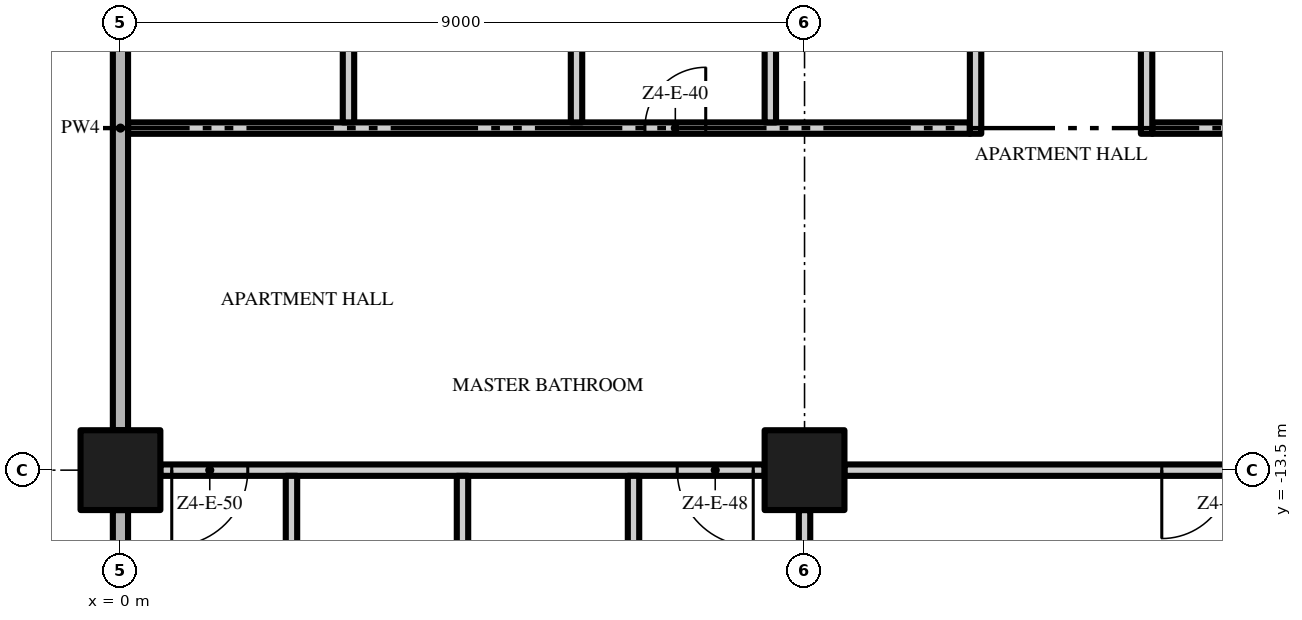
"""IFC4 building model, lengths in metres.
Left out: names, types, materials, properties, quantities, classifications, styles, units other than length and angle.
Written with IfcOpenShell. Run it as: python <this file> out.ifc"""

import sys

from ifc_helpers import new_model, si_unit, direction, frame, frame_2d, origin, origin_2d, place, context, subcontext, project, spatial, rectangle, extrude, element, fill, save


model = new_model("IFC4")
c1 = context("Model", 3, precision=1e-05, world=origin(), true_north=direction((0.0, 1.0)))
c2 = subcontext(c1, "Body", "Model", "MODEL_VIEW")
j1 = project(units=[si_unit("LENGTHUNIT", "METRE"), si_unit("PLANEANGLEUNIT", "RADIAN")], contexts=[c1])
p1 = place(None, origin())
s1 = spatial("IfcSite", under=j1, at=p1, CompositionType="ELEMENT")
p2 = place(p1, origin())
s2 = spatial("IfcBuilding", under=s1, at=p2, CompositionType="ELEMENT")
p3 = place(p2, frame((0.0, 0.0, 226.2)))
s3 = spatial("IfcBuildingStorey", under=s2, at=p3, CompositionType="ELEMENT", Elevation=226.2)
for number, where, z_axis, x_axis in (
    (1, (0.0, -13.5, 0.0), (0.0, 0.0, 1.0), (1.0, 0.0, 0.0)),
    (2, (9.0, -13.5, 0.0), (0.0, 0.0, 1.0), (1.0, 0.0, 0.0)),
):
    element("IfcColumn", number, at=place(p3, frame(where, z_axis=z_axis, x_axis=x_axis)), inside=s3, PredefinedType="COLUMN", context=c2, shape_type="SweptSolid", body=[
        extrude(rectangle(XDim=1.05, YDim=1.05, at=origin_2d()), origin(), (0.0, 0.0, 1.0), 3.5),
    ])
p4 = place(p3, frame((8.475, -13.5, 0.0), z_axis=(0.0, 0.0, 1.0), x_axis=(-1.0, 0.0, 0.0)))
e3 = element("IfcWall", 3, at=p4, inside=s3, PredefinedType="PARTITIONING", context=c2, shape_type="SweptSolid", body=[
    extrude(rectangle(XDim=7.95, YDim=0.15, at=frame_2d((3.975, 0.0))), origin(), (0.0, 0.0, 1.0), 3.5),
])
p5 = place(p4, frame((0.15, 0.0, 0.0)))
e4 = element("IfcOpeningElement", 4, at=p5, cuts=e3, PredefinedType="OPENING", context=c2, shape_type="SweptSolid", body=[
    extrude(rectangle(XDim=1.0, YDim=2.4, at=frame_2d((0.5, 1.2))), frame((0.0, 0.085, 0.0), z_axis=(0.0, -1.0, 0.0), x_axis=(1.0, 0.0, 0.0)), (0.0, 0.0, 1.0), 0.17),
])
p6 = place(p4, frame((6.8, 0.0, 0.0)))
e5 = element("IfcOpeningElement", 5, at=p6, cuts=e3, PredefinedType="OPENING", context=c2, shape_type="SweptSolid", body=[
    extrude(rectangle(XDim=1.0, YDim=2.4, at=frame_2d((0.5, 1.2))), frame((0.0, 0.085, 0.0), z_axis=(0.0, -1.0, 0.0), x_axis=(1.0, 0.0, 0.0)), (0.0, 0.0, 1.0), 0.17),
])
p7 = place(p3, frame((17.475, -13.5, 0.0), z_axis=(0.0, 0.0, 1.0), x_axis=(-1.0, 0.0, 0.0)))
e6 = element("IfcWall", 6, at=p7, inside=s3, PredefinedType="PARTITIONING", context=c2, shape_type="SweptSolid", body=[
    extrude(rectangle(XDim=7.95, YDim=0.15, at=frame_2d((3.975, 0.0))), origin(), (0.0, 0.0, 1.0), 3.5),
])
p8 = place(p7, frame((1.975, 0.0, 0.0)))
e7 = element("IfcOpeningElement", 7, at=p8, cuts=e6, PredefinedType="OPENING", context=c2, shape_type="SweptSolid", body=[
    extrude(rectangle(XDim=1.8, YDim=2.4, at=frame_2d((0.9, 1.2))), frame((0.0, 0.085, 0.0), z_axis=(0.0, -1.0, 0.0), x_axis=(1.0, 0.0, 0.0)), (0.0, 0.0, 1.0), 0.17),
])
p9 = place(p3, frame((0.1, -9.0, 0.0), z_axis=(0.0, 0.0, 1.0), x_axis=(1.0, 0.0, 0.0)))
e8 = element("IfcWall", 8, at=p9, inside=s3, PredefinedType="PARTITIONING", context=c2, shape_type="SweptSolid", body=[
    extrude(rectangle(XDim=11.075, YDim=0.15, at=frame_2d((5.537, 0.0))), origin(), (0.0, 0.0, 1.0), 3.5),
])
p10 = place(p9, frame((6.8, 0.0, 0.0)))
e9 = element("IfcOpeningElement", 9, at=p10, cuts=e8, PredefinedType="OPENING", context=c2, shape_type="SweptSolid", body=[
    extrude(rectangle(XDim=0.8, YDim=2.0, at=frame_2d((0.4, 1.0))), frame((0.0, 0.085, 0.0), z_axis=(0.0, -1.0, 0.0), x_axis=(1.0, 0.0, 0.0)), (0.0, 0.0, 1.0), 0.17),
])
p11 = place(p3, frame((13.575, -9.0, 0.0), z_axis=(0.0, 0.0, 1.0), x_axis=(1.0, 0.0, 0.0)))
e10 = element("IfcWall", 10, at=p11, inside=s3, PredefinedType="PARTITIONING", context=c2, shape_type="SweptSolid", body=[
    extrude(rectangle(XDim=13.125, YDim=0.15, at=frame_2d((6.562, 0.0))), origin(), (0.0, 0.0, 1.0), 3.5),
])
p12 = place(p11, frame((12.125, 0.0, 0.0)))
e11 = element("IfcOpeningElement", 11, at=p12, cuts=e10, PredefinedType="OPENING", context=c2, shape_type="SweptSolid", body=[
    extrude(rectangle(XDim=0.8, YDim=2.0, at=frame_2d((0.4, 1.0))), frame((0.0, 0.085, 0.0), z_axis=(0.0, -1.0, 0.0), x_axis=(1.0, 0.0, 0.0)), (0.0, 0.0, 1.0), 0.17),
])
p13 = place(p3, frame((0.0, -21.55, 0.0), z_axis=(0.0, 0.0, 1.0), x_axis=(0.0, 1.0, 0.0)))
e12 = element("IfcWall", 12, at=p13, inside=s3, PredefinedType="PARTITIONING", context=c2, shape_type="SweptSolid", body=[
    extrude(rectangle(XDim=7.525, YDim=0.2, at=frame_2d((3.763, 0.0))), origin(), (0.0, 0.0, 1.0), 3.5),
])
p14 = place(p3, frame((0.0, -12.975, 0.0), z_axis=(0.0, 0.0, 1.0), x_axis=(0.0, 1.0, 0.0)))
e13 = element("IfcWall", 13, at=p14, inside=s3, PredefinedType="PARTITIONING", context=c2, shape_type="SweptSolid", body=[
    extrude(rectangle(XDim=7.95, YDim=0.2, at=frame_2d((3.975, 0.0))), origin(), (0.0, 0.0, 1.0), 3.5),
])
p15 = place(p3, frame((2.25, -16.575, 0.0), z_axis=(0.0, 0.0, 1.0), x_axis=(0.0, 1.0, 0.0)))
e14 = element("IfcWall", 14, at=p15, inside=s3, PredefinedType="PARTITIONING", context=c2, shape_type="SweptSolid", body=[
    extrude(rectangle(XDim=3.0, YDim=0.15, at=frame_2d((1.5, 0.0))), origin(), (0.0, 0.0, 1.0), 3.5),
])
p16 = place(p3, frame((3.0, -8.925, 0.0), z_axis=(0.0, 0.0, 1.0), x_axis=(0.0, 1.0, 0.0)))
e15 = element("IfcWall", 15, at=p16, inside=s3, PredefinedType="PARTITIONING", context=c2, shape_type="SweptSolid", body=[
    extrude(rectangle(XDim=4.35, YDim=0.15, at=frame_2d((2.175, 0.0))), origin(), (0.0, 0.0, 1.0), 3.5),
])
p17 = place(p3, frame((4.5, -22.2, 0.0), z_axis=(0.0, 0.0, 1.0), x_axis=(0.0, 1.0, 0.0)))
e16 = element("IfcWall", 16, at=p17, inside=s3, PredefinedType="PARTITIONING", context=c2, shape_type="SweptSolid", body=[
    extrude(rectangle(XDim=8.625, YDim=0.15, at=frame_2d((4.312, 0.0))), origin(), (0.0, 0.0, 1.0), 3.5),
])
p18 = place(p3, frame((6.0, -8.925, 0.0), z_axis=(0.0, 0.0, 1.0), x_axis=(0.0, 1.0, 0.0)))
e17 = element("IfcWall", 17, at=p18, inside=s3, PredefinedType="PARTITIONING", context=c2, shape_type="SweptSolid", body=[
    extrude(rectangle(XDim=4.35, YDim=0.15, at=frame_2d((2.175, 0.0))), origin(), (0.0, 0.0, 1.0), 3.5),
])
p19 = place(p3, frame((6.75, -16.575, 0.0), z_axis=(0.0, 0.0, 1.0), x_axis=(0.0, 1.0, 0.0)))
e18 = element("IfcWall", 18, at=p19, inside=s3, PredefinedType="PARTITIONING", context=c2, shape_type="SweptSolid", body=[
    extrude(rectangle(XDim=3.0, YDim=0.15, at=frame_2d((1.5, 0.0))), origin(), (0.0, 0.0, 1.0), 3.5),
])
p20 = place(p3, frame((8.55, -8.925, 0.0), z_axis=(0.0, 0.0, 1.0), x_axis=(0.0, 1.0, 0.0)))
e19 = element("IfcWall", 19, at=p20, inside=s3, PredefinedType="PARTITIONING", context=c2, shape_type="SweptSolid", body=[
    extrude(rectangle(XDim=3.9, YDim=0.15, at=frame_2d((1.95, 0.0))), origin(), (0.0, 0.0, 1.0), 3.5),
])
p21 = place(p3, frame((9.0, -21.55, 0.0), z_axis=(0.0, 0.0, 1.0), x_axis=(0.0, 1.0, 0.0)))
e20 = element("IfcWall", 20, at=p21, inside=s3, PredefinedType="PARTITIONING", context=c2, shape_type="SweptSolid", body=[
    extrude(rectangle(XDim=7.525, YDim=0.15, at=frame_2d((3.763, 0.0))), origin(), (0.0, 0.0, 1.0), 3.5),
])
p22 = place(p3, frame((11.25, -9.075, 0.0), z_axis=(0.0, 0.0, 1.0), x_axis=(0.0, 1.0, 0.0)))
e21 = element("IfcWall", 21, at=p22, inside=s3, PredefinedType="PARTITIONING", context=c2, shape_type="SweptSolid", body=[
    extrude(rectangle(XDim=4.65, YDim=0.15, at=frame_2d((2.325, 0.0))), origin(), (0.0, 0.0, 1.0), 3.5),
])
p23 = place(p3, frame((13.5, -4.425, 0.0), z_axis=(0.0, 0.0, 1.0), x_axis=(0.0, -1.0, 0.0)))
e22 = element("IfcWall", 22, at=p23, inside=s3, PredefinedType="PARTITIONING", context=c2, shape_type="SweptSolid", body=[
    extrude(rectangle(XDim=4.65, YDim=0.15, at=frame_2d((2.325, 0.0))), origin(), (0.0, 0.0, 1.0), 3.5),
])
p24 = place(p23, frame((1.875, 0.0, 0.0)))
e23 = element("IfcOpeningElement", 23, at=p24, cuts=e22, PredefinedType="OPENING", context=c2, shape_type="SweptSolid", body=[
    extrude(rectangle(XDim=0.9, YDim=2.1, at=frame_2d((0.45, 1.05))), frame((0.0, 0.085, 0.0), z_axis=(0.0, -1.0, 0.0), x_axis=(1.0, 0.0, 0.0)), (0.0, 0.0, 1.0), 0.17),
])
p25 = place(p10, origin())
e24 = element("IfcDoor", 24, at=p25, inside=s3, OperationType="SINGLE_SWING_RIGHT", PredefinedType="DOOR", context=c2, shape_type="SweptSolid", body=[
    extrude(rectangle(XDim=0.8, YDim=2.0, at=frame_2d((0.4, 1.0))), frame((0.0, 0.025, 0.0), z_axis=(0.0, -1.0, 0.0), x_axis=(1.0, 0.0, 0.0)), (0.0, 0.0, 1.0), 0.05),
])
fill(e9, e24)
p26 = place(p8, origin())
e25 = element("IfcDoor", 25, at=p26, inside=s3, OperationType="DOUBLE_DOOR_SINGLE_SWING", PredefinedType="DOOR", context=c2, shape_type="SweptSolid", body=[
    extrude(rectangle(XDim=1.8, YDim=2.4, at=frame_2d((0.9, 1.2))), frame((0.0, 0.025, 0.0), z_axis=(0.0, -1.0, 0.0), x_axis=(1.0, 0.0, 0.0)), (0.0, 0.0, 1.0), 0.05),
])
fill(e7, e25)
p27 = place(p5, origin())
e26 = element("IfcDoor", 26, at=p27, inside=s3, OperationType="SINGLE_SWING_LEFT", PredefinedType="DOOR", context=c2, shape_type="SweptSolid", body=[
    extrude(rectangle(XDim=1.0, YDim=2.4, at=frame_2d((0.5, 1.2))), frame((0.0, 0.025, 0.0), z_axis=(0.0, -1.0, 0.0), x_axis=(1.0, 0.0, 0.0)), (0.0, 0.0, 1.0), 0.05),
])
fill(e4, e26)
p28 = place(p6, origin())
e27 = element("IfcDoor", 27, at=p28, inside=s3, OperationType="SINGLE_SWING_RIGHT", PredefinedType="DOOR", context=c2, shape_type="SweptSolid", body=[
    extrude(rectangle(XDim=1.0, YDim=2.4, at=frame_2d((0.5, 1.2))), frame((0.0, 0.025, 0.0), z_axis=(0.0, -1.0, 0.0), x_axis=(1.0, 0.0, 0.0)), (0.0, 0.0, 1.0), 0.05),
])
fill(e5, e27)
save(model, sys.argv[1])
